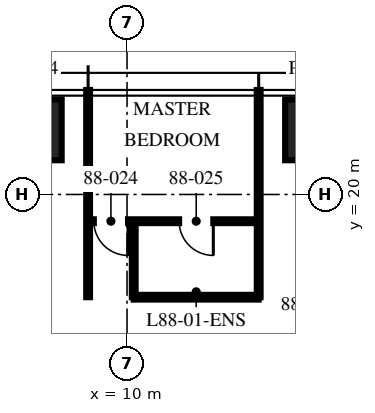
"""IFC4 building model, lengths in metres.
Left out: names, types, materials, properties, quantities, classifications, styles, units other than length and angle.
Written with IfcOpenShell. Run it as: python <this file> out.ifc"""

import sys

from ifc_helpers import new_model, si_unit, direction, frame, frame_2d, origin, origin_2d, place, context, subcontext, project, spatial, rectangle, extrude, element, fill, save


model = new_model("IFC4")
c1 = context("Model", 3, precision=1e-05, world=origin(), true_north=direction((0.0, 1.0)))
c2 = subcontext(c1, "Body", "Model", "MODEL_VIEW")
j1 = project(units=[si_unit("LENGTHUNIT", "METRE"), si_unit("PLANEANGLEUNIT", "RADIAN")], contexts=[c1])
p1 = place(None, origin())
s1 = spatial("IfcSite", under=j1, at=p1, CompositionType="ELEMENT")
p2 = place(p1, origin())
s2 = spatial("IfcBuilding", under=s1, at=p2, CompositionType="ELEMENT")
p3 = place(p2, frame((0.0, 0.0, 349.5)))
s3 = spatial("IfcBuildingStorey", under=s2, at=p3, CompositionType="ELEMENT", Elevation=349.5)
for number, where, z_axis, x_axis in (
    (1, (7.48, 21.7, 0.0), (0.0, 0.0, 1.0), (1.0, 0.0, 0.0)),
    (2, (14.96, 21.7, 0.0), (0.0, 0.0, 1.0), (1.0, 0.0, 0.0)),
):
    element("IfcColumn", number, at=place(p3, frame(where, z_axis=z_axis, x_axis=x_axis)), inside=s3, PredefinedType="COLUMN", context=c2, shape_type="SweptSolid", body=[
        extrude(rectangle(XDim=1.6, YDim=1.6, at=origin_2d()), origin(), (0.0, 0.0, 1.0), 3.75),
    ])
for number, where, z_axis, x_axis in (
    (3, (13.464, 17.296, 0.0), (0.0, 0.0, 1.0), (0.0, 1.0, 0.0)),
    (4, (8.976, 17.296, 0.0), (0.0, 0.0, 1.0), (0.0, 1.0, 0.0)),
):
    element("IfcWall", number, at=place(p3, frame(where, z_axis=z_axis, x_axis=x_axis)), inside=s3, PredefinedType="PARTITIONING", context=c2, shape_type="SweptSolid", body=[
        extrude(rectangle(XDim=5.454, YDim=0.1, at=frame_2d((2.727, 0.0))), origin(), (0.0, 0.0, 1.0), 2.85),
    ])
p4 = place(p3, frame((13.464, 19.296, 0.0), z_axis=(0.0, 0.0, 1.0), x_axis=(-1.0, 0.0, 0.0)))
e5 = element("IfcWall", 5, at=p4, inside=s3, PredefinedType="PARTITIONING", context=c2, shape_type="SweptSolid", body=[
    extrude(rectangle(XDim=4.488, YDim=0.1, at=frame_2d((2.244, 0.0))), origin(), (0.0, 0.0, 1.0), 2.56),
])
p5 = place(p4, frame((3.438, 0.0, 0.0)))
e6 = element("IfcOpeningElement", 6, at=p5, cuts=e5, PredefinedType="OPENING", context=c2, shape_type="SweptSolid", body=[
    extrude(rectangle(XDim=0.9, YDim=2.1, at=frame_2d((0.45, 1.05))), frame((0.0, 0.06, 0.0), z_axis=(0.0, -1.0, 0.0), x_axis=(1.0, 0.0, 0.0)), (0.0, 0.0, 1.0), 0.12),
])
p6 = place(p4, frame((1.194, 0.0, 0.0)))
e7 = element("IfcOpeningElement", 7, at=p6, cuts=e5, PredefinedType="OPENING", context=c2, shape_type="SweptSolid", body=[
    extrude(rectangle(XDim=0.9, YDim=2.1, at=frame_2d((0.45, 1.05))), frame((0.0, 0.06, 0.0), z_axis=(0.0, -1.0, 0.0), x_axis=(1.0, 0.0, 0.0)), (0.0, 0.0, 1.0), 0.12),
])
p7 = place(p3, frame((10.176, 17.296, 0.0), z_axis=(0.0, 0.0, 1.0), x_axis=(0.0, 1.0, 0.0)))
e8 = element("IfcWall", 8, at=p7, inside=s3, PredefinedType="PARTITIONING", context=c2, shape_type="SweptSolid", body=[
    extrude(rectangle(XDim=2.0, YDim=0.1, at=frame_2d((1.0, 0.0))), origin(), (0.0, 0.0, 1.0), 3.45),
])
p8 = place(p3, frame((13.464, 17.296, 0.0), z_axis=(0.0, 0.0, 1.0), x_axis=(-1.0, 0.0, 0.0)))
e9 = element("IfcWall", 9, at=p8, inside=s3, PredefinedType="PARTITIONING", context=c2, shape_type="SweptSolid", body=[
    extrude(rectangle(XDim=3.288, YDim=0.125, at=frame_2d((1.644, 0.0))), origin(), (0.0, 0.0, 1.0), 2.56),
])
p9 = place(p5, origin())
e10 = element("IfcDoor", 10, at=p9, inside=s3, OperationType="SINGLE_SWING_LEFT", PredefinedType="DOOR", context=c2, shape_type="SweptSolid", body=[
    extrude(rectangle(XDim=0.9, YDim=2.1, at=frame_2d((0.45, 1.05))), frame((0.0, 0.025, 0.0), z_axis=(0.0, -1.0, 0.0), x_axis=(1.0, 0.0, 0.0)), (0.0, 0.0, 1.0), 0.05),
])
fill(e6, e10)
p10 = place(p6, origin())
e11 = element("IfcDoor", 11, at=p10, inside=s3, OperationType="SINGLE_SWING_LEFT", PredefinedType="DOOR", context=c2, shape_type="SweptSolid", body=[
    extrude(rectangle(XDim=0.9, YDim=2.1, at=frame_2d((0.45, 1.05))), frame((0.0, 0.025, 0.0), z_axis=(0.0, -1.0, 0.0), x_axis=(1.0, 0.0, 0.0)), (0.0, 0.0, 1.0), 0.05),
])
fill(e7, e11)
save(model, sys.argv[1])
